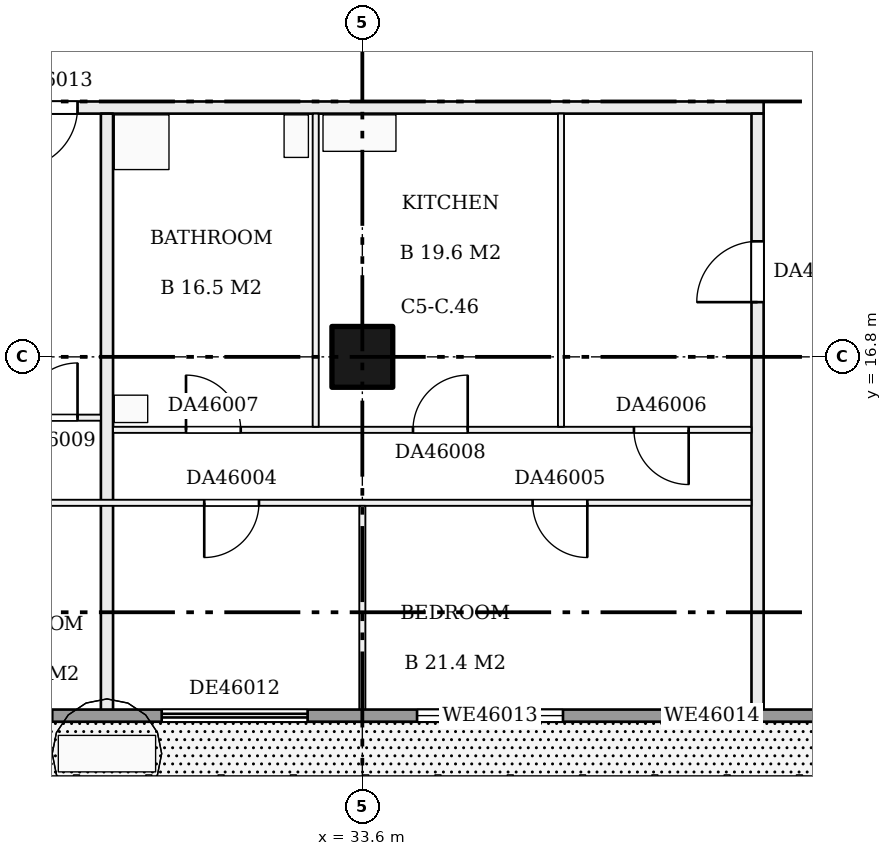
"""IFC4 building model, lengths in metres.
Left out: names, types, materials, properties, quantities, classifications, styles, units other than length and angle.
Written with IfcOpenShell. Run it as: python <this file> out.ifc"""

import sys

from ifc_helpers import new_model, si_unit, direction, frame, frame_2d, origin, origin_2d, place, context, subcontext, project, spatial, rectangle, extrude, element, fill, save


model = new_model("IFC4")
c1 = context("Model", 3, precision=1e-05, world=origin(), true_north=direction((0.0, 1.0)))
c2 = subcontext(c1, "Body", "Model", "MODEL_VIEW")
j1 = project(units=[si_unit("LENGTHUNIT", "METRE"), si_unit("PLANEANGLEUNIT", "RADIAN")], contexts=[c1])
p1 = place(None, origin())
s1 = spatial("IfcSite", under=j1, at=p1, CompositionType="ELEMENT")
p2 = place(p1, origin())
s2 = spatial("IfcBuilding", under=s1, at=p2, CompositionType="ELEMENT")
p3 = place(p2, frame((0.0, 0.0, 179.2)))
s3 = spatial("IfcBuildingStorey", under=s2, at=p3, CompositionType="ELEMENT", Elevation=179.2)
p4 = place(p3, frame((33.6, 16.8, 0.0), z_axis=(0.0, 0.0, 1.0), x_axis=(1.0, 0.0, 0.0)))
e1 = element("IfcColumn", 1, at=p4, inside=s3, PredefinedType="COLUMN", context=c2, shape_type="SweptSolid", body=[
    extrude(rectangle(XDim=1.0, YDim=1.0, at=origin_2d()), origin(), (0.0, 0.0, 1.0), 3.22),
])
p5 = place(p3, frame((21.1, 14.4, 0.0), z_axis=(0.0, 0.0, 1.0), x_axis=(1.0, 0.0, 0.0)))
e2 = element("IfcWall", 2, at=p5, inside=s3, PredefinedType="PARTITIONING", context=c2, shape_type="SweptSolid", body=[
    extrude(rectangle(XDim=18.9, YDim=0.1, at=frame_2d((9.45, 0.0))), origin(), (0.0, 0.0, 1.0), 3.22),
])
p6 = place(p5, frame((1.6, 0.0, 0.0)))
e3 = element("IfcOpeningElement", 3, at=p6, cuts=e2, PredefinedType="OPENING", context=c2, shape_type="SweptSolid", body=[
    extrude(rectangle(XDim=0.9, YDim=2.1, at=frame_2d((0.45, 1.05))), frame((0.0, 0.06, 0.0), z_axis=(0.0, -1.0, 0.0), x_axis=(1.0, 0.0, 0.0)), (0.0, 0.0, 1.0), 0.12),
])
p7 = place(p5, frame((5.7, 0.0, 0.0)))
e4 = element("IfcOpeningElement", 4, at=p7, cuts=e2, PredefinedType="OPENING", context=c2, shape_type="SweptSolid", body=[
    extrude(rectangle(XDim=0.9, YDim=2.1, at=frame_2d((0.45, 1.05))), frame((0.0, 0.06, 0.0), z_axis=(0.0, -1.0, 0.0), x_axis=(1.0, 0.0, 0.0)), (0.0, 0.0, 1.0), 0.12),
])
p8 = place(p5, frame((9.9, 0.0, 0.0)))
e5 = element("IfcOpeningElement", 5, at=p8, cuts=e2, PredefinedType="OPENING", context=c2, shape_type="SweptSolid", body=[
    extrude(rectangle(XDim=0.9, YDim=2.1, at=frame_2d((0.45, 1.05))), frame((0.0, 0.06, 0.0), z_axis=(0.0, -1.0, 0.0), x_axis=(1.0, 0.0, 0.0)), (0.0, 0.0, 1.0), 0.12),
])
p9 = place(p5, frame((15.3, 0.0, 0.0)))
e6 = element("IfcOpeningElement", 6, at=p9, cuts=e2, PredefinedType="OPENING", context=c2, shape_type="SweptSolid", body=[
    extrude(rectangle(XDim=0.9, YDim=2.1, at=frame_2d((0.45, 1.05))), frame((0.0, 0.06, 0.0), z_axis=(0.0, -1.0, 0.0), x_axis=(1.0, 0.0, 0.0)), (0.0, 0.0, 1.0), 0.12),
])
p10 = place(p3, frame((29.5, 15.6, 0.0), z_axis=(0.0, 0.0, 1.0), x_axis=(1.0, 0.0, 0.0)))
e7 = element("IfcWall", 7, at=p10, inside=s3, PredefinedType="PARTITIONING", context=c2, shape_type="SweptSolid", body=[
    extrude(rectangle(XDim=10.5, YDim=0.1, at=frame_2d((5.25, 0.0))), origin(), (0.0, 0.0, 1.0), 3.22),
])
p11 = place(p10, frame((8.567, 0.0, 0.0)))
e8 = element("IfcOpeningElement", 8, at=p11, cuts=e7, PredefinedType="OPENING", context=c2, shape_type="SweptSolid", body=[
    extrude(rectangle(XDim=0.9, YDim=2.1, at=frame_2d((0.45, 1.05))), frame((0.0, 0.06, 0.0), z_axis=(0.0, -1.0, 0.0), x_axis=(1.0, 0.0, 0.0)), (0.0, 0.0, 1.0), 0.12),
])
p12 = place(p10, frame((1.2, 0.0, 0.0)))
e9 = element("IfcOpeningElement", 9, at=p12, cuts=e7, PredefinedType="OPENING", context=c2, shape_type="SweptSolid", body=[
    extrude(rectangle(XDim=0.9, YDim=2.1, at=frame_2d((0.45, 1.05))), frame((0.0, 0.06, 0.0), z_axis=(0.0, -1.0, 0.0), x_axis=(1.0, 0.0, 0.0)), (0.0, 0.0, 1.0), 0.12),
])
p13 = place(p10, frame((4.933, 0.0, 0.0)))
e10 = element("IfcOpeningElement", 10, at=p13, cuts=e7, PredefinedType="OPENING", context=c2, shape_type="SweptSolid", body=[
    extrude(rectangle(XDim=0.9, YDim=2.1, at=frame_2d((0.45, 1.05))), frame((0.0, 0.06, 0.0), z_axis=(0.0, -1.0, 0.0), x_axis=(1.0, 0.0, 0.0)), (0.0, 0.0, 1.0), 0.12),
])
p14 = place(p3, frame((21.1, 15.8, 0.0), z_axis=(0.0, 0.0, 1.0), x_axis=(1.0, 0.0, 0.0)))
e11 = element("IfcWall", 11, at=p14, inside=s3, PredefinedType="PARTITIONING", context=c2, shape_type="SweptSolid", body=[
    extrude(rectangle(XDim=8.2, YDim=0.1, at=frame_2d((4.1, 0.0))), origin(), (0.0, 0.0, 1.0), 3.22),
])
p15 = place(p14, frame((6.916, 0.0, 0.0)))
e12 = element("IfcOpeningElement", 12, at=p15, cuts=e11, PredefinedType="OPENING", context=c2, shape_type="SweptSolid", body=[
    extrude(rectangle(XDim=0.9, YDim=2.1, at=frame_2d((0.45, 1.05))), frame((0.0, 0.06, 0.0), z_axis=(0.0, -1.0, 0.0), x_axis=(1.0, 0.0, 0.0)), (0.0, 0.0, 1.0), 0.12),
])
p16 = place(p14, frame((0.5, 0.0, 0.0)))
e13 = element("IfcOpeningElement", 13, at=p16, cuts=e11, PredefinedType="OPENING", context=c2, shape_type="SweptSolid", body=[
    extrude(rectangle(XDim=0.9, YDim=2.1, at=frame_2d((0.45, 1.05))), frame((0.0, 0.06, 0.0), z_axis=(0.0, -1.0, 0.0), x_axis=(1.0, 0.0, 0.0)), (0.0, 0.0, 1.0), 0.12),
])
p17 = place(p14, frame((2.49, 0.0, 0.0)))
e14 = element("IfcOpeningElement", 14, at=p17, cuts=e11, PredefinedType="OPENING", context=c2, shape_type="SweptSolid", body=[
    extrude(rectangle(XDim=0.9, YDim=2.1, at=frame_2d((0.45, 1.05))), frame((0.0, 0.06, 0.0), z_axis=(0.0, -1.0, 0.0), x_axis=(1.0, 0.0, 0.0)), (0.0, 0.0, 1.0), 0.12),
])
p18 = place(p14, frame((4.832, 0.0, 0.0)))
e15 = element("IfcOpeningElement", 15, at=p18, cuts=e11, PredefinedType="OPENING", context=c2, shape_type="SweptSolid", body=[
    extrude(rectangle(XDim=0.9, YDim=2.1, at=frame_2d((0.45, 1.05))), frame((0.0, 0.06, 0.0), z_axis=(0.0, -1.0, 0.0), x_axis=(1.0, 0.0, 0.0)), (0.0, 0.0, 1.0), 0.12),
])
p19 = place(p3, frame((20.9, 20.9, 0.0), z_axis=(0.0, 0.0, 1.0), x_axis=(1.0, 0.0, 0.0)))
e16 = element("IfcWall", 16, at=p19, inside=s3, PredefinedType="PARTITIONING", context=c2, shape_type="SweptSolid", body=[
    extrude(rectangle(XDim=19.3, YDim=0.2, at=frame_2d((9.65, 0.0))), origin(), (0.0, 0.0, 1.0), 3.22),
])
p20 = place(p19, frame((7.016, 0.0, 0.0)))
e17 = element("IfcOpeningElement", 17, at=p20, cuts=e16, PredefinedType="OPENING", context=c2, shape_type="SweptSolid", body=[
    extrude(rectangle(XDim=1.0, YDim=2.1, at=frame_2d((0.5, 1.05))), frame((0.0, 0.11, 0.0), z_axis=(0.0, -1.0, 0.0), x_axis=(1.0, 0.0, 0.0)), (0.0, 0.0, 1.0), 0.22),
])
p21 = place(p3, frame((29.4, 10.9, 0.0), z_axis=(0.0, 0.0, 1.0), x_axis=(0.0, 1.0, 0.0)))
e18 = element("IfcWall", 18, at=p21, inside=s3, PredefinedType="PARTITIONING", context=c2, shape_type="SweptSolid", body=[
    extrude(rectangle(XDim=9.9, YDim=0.2, at=frame_2d((4.95, 0.0))), origin(), (0.0, 0.0, 1.0), 3.22),
])
p22 = place(p3, frame((32.833, 15.65, 0.0), z_axis=(0.0, 0.0, 1.0), x_axis=(0.0, 1.0, 0.0)))
e19 = element("IfcWall", 19, at=p22, inside=s3, PredefinedType="PARTITIONING", context=c2, shape_type="SweptSolid", body=[
    extrude(rectangle(XDim=5.15, YDim=0.1, at=frame_2d((2.575, 0.0))), origin(), (0.0, 0.0, 1.0), 3.22),
])
p23 = place(p3, frame((33.6, 10.9, 0.0), z_axis=(0.0, 0.0, 1.0), x_axis=(0.0, 1.0, 0.0)))
e20 = element("IfcWall", 20, at=p23, inside=s3, PredefinedType="PARTITIONING", context=c2, shape_type="SweptSolid", body=[
    extrude(rectangle(XDim=3.45, YDim=0.1, at=frame_2d((1.725, 0.0))), origin(), (0.0, 0.0, 1.0), 3.22),
])
p24 = place(p3, frame((36.867, 15.65, 0.0), z_axis=(0.0, 0.0, 1.0), x_axis=(0.0, 1.0, 0.0)))
e21 = element("IfcWall", 21, at=p24, inside=s3, PredefinedType="PARTITIONING", context=c2, shape_type="SweptSolid", body=[
    extrude(rectangle(XDim=5.15, YDim=0.1, at=frame_2d((2.575, 0.0))), origin(), (0.0, 0.0, 1.0), 3.22),
])
p25 = place(p3, frame((40.1, 10.9, 0.0), z_axis=(0.0, 0.0, 1.0), x_axis=(0.0, 1.0, 0.0)))
e22 = element("IfcWall", 22, at=p25, inside=s3, PredefinedType="PARTITIONING", context=c2, shape_type="SweptSolid", body=[
    extrude(rectangle(XDim=9.9, YDim=0.2, at=frame_2d((4.95, 0.0))), origin(), (0.0, 0.0, 1.0), 3.22),
])
p26 = place(p25, frame((6.8, 0.0, 0.0)))
e23 = element("IfcOpeningElement", 23, at=p26, cuts=e22, PredefinedType="OPENING", context=c2, shape_type="SweptSolid", body=[
    extrude(rectangle(XDim=1.0, YDim=2.1, at=frame_2d((0.5, 1.05))), frame((0.0, 0.11, 0.0), z_axis=(0.0, -1.0, 0.0), x_axis=(1.0, 0.0, 0.0)), (0.0, 0.0, 1.0), 0.22),
])
p27 = place(p3, frame((13.2, 10.9, 0.0), z_axis=(0.0, 0.0, 1.0), x_axis=(1.0, 0.0, 0.0)))
e24 = element("IfcWall", 24, at=p27, inside=s3, PredefinedType="SOLIDWALL", context=c2, shape_type="SweptSolid", body=[
    extrude(rectangle(XDim=28.8, YDim=0.2, at=frame_2d((14.4, 0.0))), origin(), (0.0, 0.0, 1.0), 3.22),
])
p28 = place(p27, frame((0.3, 0.0, 0.0)))
e25 = element("IfcOpeningElement", 25, at=p28, cuts=e24, PredefinedType="OPENING", context=c2, shape_type="SweptSolid", body=[
    extrude(rectangle(XDim=2.4, YDim=2.2, at=frame_2d((1.2, 1.1))), frame((0.0, 0.11, 0.0), z_axis=(0.0, -1.0, 0.0), x_axis=(1.0, 0.0, 0.0)), (0.0, 0.0, 1.0), 0.22),
])
p29 = place(p27, frame((4.5, 0.0, 0.0)))
e26 = element("IfcOpeningElement", 26, at=p29, cuts=e24, PredefinedType="OPENING", context=c2, shape_type="SweptSolid", body=[
    extrude(rectangle(XDim=2.4, YDim=2.2, at=frame_2d((1.2, 1.1))), frame((0.0, 0.11, 0.0), z_axis=(0.0, -1.0, 0.0), x_axis=(1.0, 0.0, 0.0)), (0.0, 0.0, 1.0), 0.22),
])
p30 = place(p27, frame((8.7, 0.0, 0.9)))
e27 = element("IfcOpeningElement", 27, at=p30, cuts=e24, PredefinedType="OPENING", context=c2, shape_type="SweptSolid", body=[
    extrude(rectangle(XDim=2.4, YDim=1.5, at=frame_2d((1.2, 0.75))), frame((0.0, 0.11, 0.0), z_axis=(0.0, -1.0, 0.0), x_axis=(1.0, 0.0, 0.0)), (0.0, 0.0, 1.0), 0.22),
])
p31 = place(p27, frame((12.9, 0.0, 0.9)))
e28 = element("IfcOpeningElement", 28, at=p31, cuts=e24, PredefinedType="OPENING", context=c2, shape_type="SweptSolid", body=[
    extrude(rectangle(XDim=2.4, YDim=1.5, at=frame_2d((1.2, 0.75))), frame((0.0, 0.11, 0.0), z_axis=(0.0, -1.0, 0.0), x_axis=(1.0, 0.0, 0.0)), (0.0, 0.0, 1.0), 0.22),
])
p32 = place(p27, frame((17.1, 0.0, 0.0)))
e29 = element("IfcOpeningElement", 29, at=p32, cuts=e24, PredefinedType="OPENING", context=c2, shape_type="SweptSolid", body=[
    extrude(rectangle(XDim=2.4, YDim=2.2, at=frame_2d((1.2, 1.1))), frame((0.0, 0.11, 0.0), z_axis=(0.0, -1.0, 0.0), x_axis=(1.0, 0.0, 0.0)), (0.0, 0.0, 1.0), 0.22),
])
p33 = place(p27, frame((21.3, 0.0, 0.9)))
e30 = element("IfcOpeningElement", 30, at=p33, cuts=e24, PredefinedType="OPENING", context=c2, shape_type="SweptSolid", body=[
    extrude(rectangle(XDim=2.4, YDim=1.5, at=frame_2d((1.2, 0.75))), frame((0.0, 0.11, 0.0), z_axis=(0.0, -1.0, 0.0), x_axis=(1.0, 0.0, 0.0)), (0.0, 0.0, 1.0), 0.22),
])
p34 = place(p27, frame((25.5, 0.0, 0.9)))
e31 = element("IfcOpeningElement", 31, at=p34, cuts=e24, PredefinedType="OPENING", context=c2, shape_type="SweptSolid", body=[
    extrude(rectangle(XDim=1.3, YDim=1.5, at=frame_2d((0.65, 0.75))), frame((0.0, 0.11, 0.0), z_axis=(0.0, -1.0, 0.0), x_axis=(1.0, 0.0, 0.0)), (0.0, 0.0, 1.0), 0.22),
])
p35 = place(p8, frame((0.9, 0.0, 0.0), z_axis=(0.0, 0.0, 1.0), x_axis=(-1.0, 0.0, 0.0)))
e32 = element("IfcDoor", 32, at=p35, inside=s3, OperationType="SINGLE_SWING_RIGHT", PredefinedType="DOOR", context=c2, shape_type="SweptSolid", body=[
    extrude(rectangle(XDim=0.9, YDim=2.1, at=frame_2d((0.45, 1.05))), frame((0.0, 0.025, 0.0), z_axis=(0.0, -1.0, 0.0), x_axis=(1.0, 0.0, 0.0)), (0.0, 0.0, 1.0), 0.05),
])
fill(e5, e32)
p36 = place(p9, frame((0.9, 0.0, 0.0), z_axis=(0.0, 0.0, 1.0), x_axis=(-1.0, 0.0, 0.0)))
e33 = element("IfcDoor", 33, at=p36, inside=s3, OperationType="SINGLE_SWING_LEFT", PredefinedType="DOOR", context=c2, shape_type="SweptSolid", body=[
    extrude(rectangle(XDim=0.9, YDim=2.1, at=frame_2d((0.45, 1.05))), frame((0.0, 0.025, 0.0), z_axis=(0.0, -1.0, 0.0), x_axis=(1.0, 0.0, 0.0)), (0.0, 0.0, 1.0), 0.05),
])
fill(e6, e33)
p37 = place(p11, frame((0.9, 0.0, 0.0), z_axis=(0.0, 0.0, 1.0), x_axis=(-1.0, 0.0, 0.0)))
e34 = element("IfcDoor", 34, at=p37, inside=s3, OperationType="SINGLE_SWING_LEFT", PredefinedType="DOOR", context=c2, shape_type="SweptSolid", body=[
    extrude(rectangle(XDim=0.9, YDim=2.1, at=frame_2d((0.45, 1.05))), frame((0.0, 0.025, 0.0), z_axis=(0.0, -1.0, 0.0), x_axis=(1.0, 0.0, 0.0)), (0.0, 0.0, 1.0), 0.05),
])
fill(e8, e34)
p38 = place(p12, origin())
e35 = element("IfcDoor", 35, at=p38, inside=s3, OperationType="SINGLE_SWING_LEFT", PredefinedType="DOOR", context=c2, shape_type="SweptSolid", body=[
    extrude(rectangle(XDim=0.9, YDim=2.1, at=frame_2d((0.45, 1.05))), frame((0.0, 0.025, 0.0), z_axis=(0.0, -1.0, 0.0), x_axis=(1.0, 0.0, 0.0)), (0.0, 0.0, 1.0), 0.05),
])
fill(e9, e35)
p39 = place(p13, origin())
e36 = element("IfcDoor", 36, at=p39, inside=s3, OperationType="SINGLE_SWING_RIGHT", PredefinedType="DOOR", context=c2, shape_type="SweptSolid", body=[
    extrude(rectangle(XDim=0.9, YDim=2.1, at=frame_2d((0.45, 1.05))), frame((0.0, 0.025, 0.0), z_axis=(0.0, -1.0, 0.0), x_axis=(1.0, 0.0, 0.0)), (0.0, 0.0, 1.0), 0.05),
])
fill(e10, e36)
p40 = place(p15, origin())
e37 = element("IfcDoor", 37, at=p40, inside=s3, OperationType="SINGLE_SWING_RIGHT", PredefinedType="DOOR", context=c2, shape_type="SweptSolid", body=[
    extrude(rectangle(XDim=0.9, YDim=2.1, at=frame_2d((0.45, 1.05))), frame((0.0, 0.025, 0.0), z_axis=(0.0, -1.0, 0.0), x_axis=(1.0, 0.0, 0.0)), (0.0, 0.0, 1.0), 0.05),
])
fill(e12, e37)
p41 = place(p20, frame((1.0, 0.0, 0.0), z_axis=(0.0, 0.0, 1.0), x_axis=(-1.0, 0.0, 0.0)))
e38 = element("IfcDoor", 38, at=p41, inside=s3, OperationType="SINGLE_SWING_RIGHT", PredefinedType="DOOR", context=c2, shape_type="SweptSolid", body=[
    extrude(rectangle(XDim=1.0, YDim=2.1, at=frame_2d((0.5, 1.05))), frame((0.0, 0.025, 0.0), z_axis=(0.0, -1.0, 0.0), x_axis=(1.0, 0.0, 0.0)), (0.0, 0.0, 1.0), 0.05),
])
fill(e17, e38)
p42 = place(p26, origin())
e39 = element("IfcDoor", 39, at=p42, inside=s3, OperationType="SINGLE_SWING_LEFT", PredefinedType="DOOR", context=c2, shape_type="SweptSolid", body=[
    extrude(rectangle(XDim=1.0, YDim=2.1, at=frame_2d((0.5, 1.05))), frame((0.0, 0.025, 0.0), z_axis=(0.0, -1.0, 0.0), x_axis=(1.0, 0.0, 0.0)), (0.0, 0.0, 1.0), 0.05),
])
fill(e23, e39)
p43 = place(p32, origin())
e40 = element("IfcDoor", 40, at=p43, inside=s3, OperationType="DOUBLE_DOOR_SLIDING", PredefinedType="DOOR", context=c2, shape_type="SweptSolid", body=[
    extrude(rectangle(XDim=2.4, YDim=2.2, at=frame_2d((1.2, 1.1))), frame((0.0, 0.025, 0.0), z_axis=(0.0, -1.0, 0.0), x_axis=(1.0, 0.0, 0.0)), (0.0, 0.0, 1.0), 0.05),
])
fill(e29, e40)
p44 = place(p33, origin())
e41 = element("IfcWindow", 41, at=p44, inside=s3, PartitioningType="SINGLE_PANEL", PredefinedType="WINDOW", context=c2, shape_type="SweptSolid", body=[
    extrude(rectangle(XDim=2.4, YDim=1.5, at=frame_2d((1.2, 0.75))), frame((0.0, 0.03, 0.0), z_axis=(0.0, -1.0, 0.0), x_axis=(1.0, 0.0, 0.0)), (0.0, 0.0, 1.0), 0.06),
])
fill(e30, e41)
p45 = place(p34, origin())
e42 = element("IfcWindow", 42, at=p45, inside=s3, PartitioningType="SINGLE_PANEL", PredefinedType="WINDOW", context=c2, shape_type="SweptSolid", body=[
    extrude(rectangle(XDim=1.3, YDim=1.5, at=frame_2d((0.65, 0.75))), frame((0.0, 0.03, 0.0), z_axis=(0.0, -1.0, 0.0), x_axis=(1.0, 0.0, 0.0)), (0.0, 0.0, 1.0), 0.06),
])
fill(e31, e42)
save(model, sys.argv[1])
